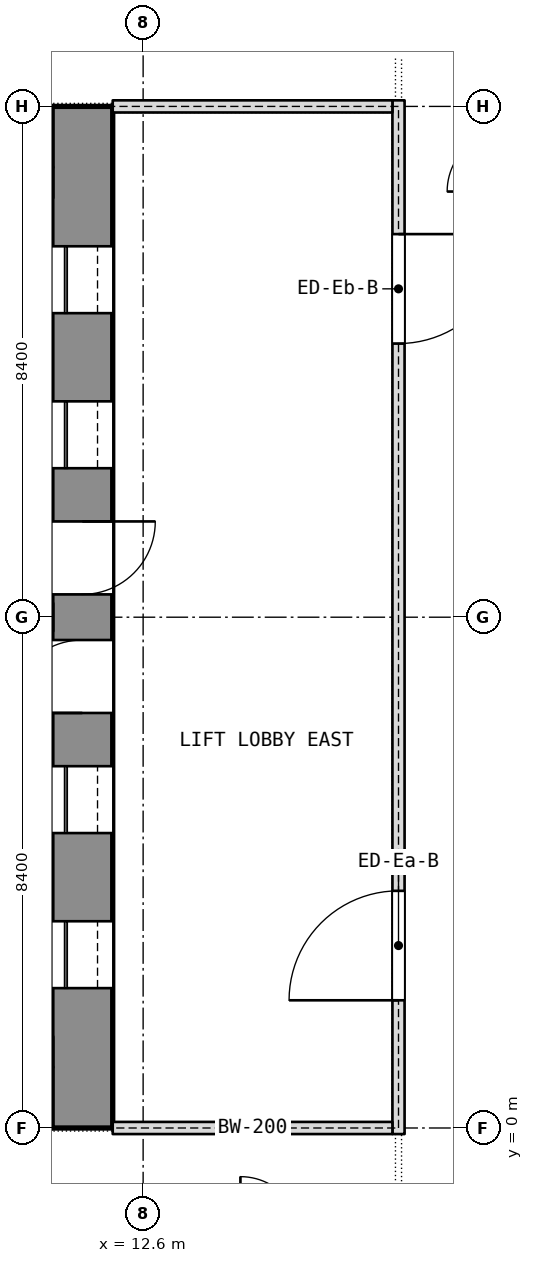
"""IFC4 building model, lengths in metres.
Left out: names, types, materials, properties, quantities, classifications, styles, units other than length and angle.
Written with IfcOpenShell. Run it as: python <this file> out.ifc"""

import sys

from ifc_helpers import new_model, si_unit, direction, frame, frame_2d, origin, place, context, subcontext, project, spatial, rectangle, extrude, element, fill, save


model = new_model("IFC4")
c1 = context("Model", 3, precision=1e-05, world=origin(), true_north=direction((0.0, 1.0)))
c2 = subcontext(c1, "Body", "Model", "MODEL_VIEW")
j1 = project(units=[si_unit("LENGTHUNIT", "METRE"), si_unit("PLANEANGLEUNIT", "RADIAN")], contexts=[c1])
p1 = place(None, origin())
s1 = spatial("IfcSite", under=j1, at=p1, CompositionType="ELEMENT")
p2 = place(p1, origin())
s2 = spatial("IfcBuilding", under=s1, at=p2, CompositionType="ELEMENT")
p3 = place(p2, frame((0.0, 0.0, 162.5)))
s3 = spatial("IfcBuildingStorey", under=s2, at=p3, CompositionType="ELEMENT", Elevation=162.5)
p4 = place(p3, frame((11.6, 0.0, 0.0), z_axis=(0.0, 0.0, 1.0), x_axis=(0.0, 1.0, 0.0)))
e1 = element("IfcWall", 1, at=p4, inside=s3, PredefinedType="SHEAR", context=c2, shape_type="SweptSolid", body=[
    extrude(rectangle(XDim=16.8, YDim=1.0, at=frame_2d((8.4, 0.0))), origin(), (0.0, 0.0, 1.0), 3.6),
])
p5 = place(p4, frame((2.3, 0.0, 0.0)))
e2 = element("IfcOpeningElement", 2, at=p5, cuts=e1, PredefinedType="OPENING", context=c2, shape_type="SweptSolid", body=[
    extrude(rectangle(XDim=1.1, YDim=2.1, at=frame_2d((0.55, 1.05))), frame((0.0, 0.5, 0.0), z_axis=(0.0, -1.0, 0.0), x_axis=(1.0, 0.0, 0.0)), (0.0, 0.0, 1.0), 1.0),
])
p6 = place(p4, frame((4.85, 0.0, 0.0)))
e3 = element("IfcOpeningElement", 3, at=p6, cuts=e1, PredefinedType="OPENING", context=c2, shape_type="SweptSolid", body=[
    extrude(rectangle(XDim=1.1, YDim=2.1, at=frame_2d((0.55, 1.05))), frame((0.0, 0.5, 0.0), z_axis=(0.0, -1.0, 0.0), x_axis=(1.0, 0.0, 0.0)), (0.0, 0.0, 1.0), 1.0),
])
p7 = place(p4, frame((6.825, 0.0, 0.0)))
e4 = element("IfcOpeningElement", 4, at=p7, cuts=e1, PredefinedType="OPENING", context=c2, shape_type="SweptSolid", body=[
    extrude(rectangle(XDim=1.2, YDim=2.1, at=frame_2d((0.6, 1.05))), frame((0.0, 0.5, 0.0), z_axis=(0.0, -1.0, 0.0), x_axis=(1.0, 0.0, 0.0)), (0.0, 0.0, 1.0), 1.0),
])
p8 = place(p4, frame((13.4, 0.0, 0.0)))
e5 = element("IfcOpeningElement", 5, at=p8, cuts=e1, PredefinedType="OPENING", context=c2, shape_type="SweptSolid", body=[
    extrude(rectangle(XDim=1.1, YDim=2.1, at=frame_2d((0.55, 1.05))), frame((0.0, 0.5, 0.0), z_axis=(0.0, -1.0, 0.0), x_axis=(1.0, 0.0, 0.0)), (0.0, 0.0, 1.0), 1.0),
])
p9 = place(p4, frame((10.85, 0.0, 0.0)))
e6 = element("IfcOpeningElement", 6, at=p9, cuts=e1, PredefinedType="OPENING", context=c2, shape_type="SweptSolid", body=[
    extrude(rectangle(XDim=1.1, YDim=2.1, at=frame_2d((0.55, 1.05))), frame((0.0, 0.5, 0.0), z_axis=(0.0, -1.0, 0.0), x_axis=(1.0, 0.0, 0.0)), (0.0, 0.0, 1.0), 1.0),
])
p10 = place(p4, frame((8.775, 0.0, 0.0)))
e7 = element("IfcOpeningElement", 7, at=p10, cuts=e1, PredefinedType="OPENING", context=c2, shape_type="SweptSolid", body=[
    extrude(rectangle(XDim=1.2, YDim=2.1, at=frame_2d((0.6, 1.05))), frame((0.0, 0.5, 0.0), z_axis=(0.0, -1.0, 0.0), x_axis=(1.0, 0.0, 0.0)), (0.0, 0.0, 1.0), 1.0),
])
p11 = place(p3, frame((16.8, -0.1, 0.0), z_axis=(0.0, 0.0, 1.0), x_axis=(0.0, 1.0, 0.0)))
e8 = element("IfcWall", 8, at=p11, inside=s3, PredefinedType="PARTITIONING", context=c2, shape_type="SweptSolid", body=[
    extrude(rectangle(XDim=17.0, YDim=0.2, at=frame_2d((8.5, 0.0))), origin(), (0.0, 0.0, 1.0), 3.34),
])
p12 = place(p11, frame((2.2, 0.0, 0.0)))
e9 = element("IfcOpeningElement", 9, at=p12, cuts=e8, PredefinedType="OPENING", context=c2, shape_type="SweptSolid", body=[
    extrude(rectangle(XDim=1.8, YDim=2.1, at=frame_2d((0.9, 1.05))), frame((0.0, 0.1, 0.0), z_axis=(0.0, -1.0, 0.0), x_axis=(1.0, 0.0, 0.0)), (0.0, 0.0, 1.0), 0.2),
])
p13 = place(p11, frame((13.0, 0.0, 0.0)))
e10 = element("IfcOpeningElement", 10, at=p13, cuts=e8, PredefinedType="OPENING", context=c2, shape_type="SweptSolid", body=[
    extrude(rectangle(XDim=1.8, YDim=2.1, at=frame_2d((0.9, 1.05))), frame((0.0, 0.1, 0.0), z_axis=(0.0, -1.0, 0.0), x_axis=(1.0, 0.0, 0.0)), (0.0, 0.0, 1.0), 0.2),
])
for number, where, z_axis, x_axis in (
    (11, (12.1, 0.0, 0.0), (0.0, 0.0, 1.0), (1.0, 0.0, 0.0)),
    (12, (12.1, 16.8, 0.0), (0.0, 0.0, 1.0), (1.0, 0.0, 0.0)),
):
    element("IfcWall", number, at=place(p3, frame(where, z_axis=z_axis, x_axis=x_axis)), inside=s3, PredefinedType="PARTITIONING", context=c2, shape_type="SweptSolid", body=[
        extrude(rectangle(XDim=4.6, YDim=0.2, at=frame_2d((2.3, 0.0))), origin(), (0.0, 0.0, 1.0), 2.89),
    ])
p14 = place(p5, origin())
e13 = element("IfcDoor", 13, at=p14, inside=s3, OperationType="SLIDING_TO_LEFT", PredefinedType="DOOR", context=c2, shape_type="SweptSolid", body=[
    extrude(rectangle(XDim=1.1, YDim=2.1, at=frame_2d((0.55, 1.05))), frame((0.0, 0.025, 0.0), z_axis=(0.0, -1.0, 0.0), x_axis=(1.0, 0.0, 0.0)), (0.0, 0.0, 1.0), 0.05),
])
fill(e2, e13)
p15 = place(p6, origin())
e14 = element("IfcDoor", 14, at=p15, inside=s3, OperationType="SLIDING_TO_LEFT", PredefinedType="DOOR", context=c2, shape_type="SweptSolid", body=[
    extrude(rectangle(XDim=1.1, YDim=2.1, at=frame_2d((0.55, 1.05))), frame((0.0, 0.025, 0.0), z_axis=(0.0, -1.0, 0.0), x_axis=(1.0, 0.0, 0.0)), (0.0, 0.0, 1.0), 0.05),
])
fill(e3, e14)
p16 = place(p7, origin())
e15 = element("IfcDoor", 15, at=p16, inside=s3, OperationType="SINGLE_SWING_LEFT", PredefinedType="DOOR", context=c2, shape_type="SweptSolid", body=[
    extrude(rectangle(XDim=1.2, YDim=2.1, at=frame_2d((0.6, 1.05))), frame((0.0, 0.025, 0.0), z_axis=(0.0, -1.0, 0.0), x_axis=(1.0, 0.0, 0.0)), (0.0, 0.0, 1.0), 0.05),
])
fill(e4, e15)
p17 = place(p8, origin())
e16 = element("IfcDoor", 16, at=p17, inside=s3, OperationType="SLIDING_TO_LEFT", PredefinedType="DOOR", context=c2, shape_type="SweptSolid", body=[
    extrude(rectangle(XDim=1.1, YDim=2.1, at=frame_2d((0.55, 1.05))), frame((0.0, 0.025, 0.0), z_axis=(0.0, -1.0, 0.0), x_axis=(1.0, 0.0, 0.0)), (0.0, 0.0, 1.0), 0.05),
])
fill(e5, e16)
p18 = place(p9, origin())
e17 = element("IfcDoor", 17, at=p18, inside=s3, OperationType="SLIDING_TO_LEFT", PredefinedType="DOOR", context=c2, shape_type="SweptSolid", body=[
    extrude(rectangle(XDim=1.1, YDim=2.1, at=frame_2d((0.55, 1.05))), frame((0.0, 0.025, 0.0), z_axis=(0.0, -1.0, 0.0), x_axis=(1.0, 0.0, 0.0)), (0.0, 0.0, 1.0), 0.05),
])
fill(e6, e17)
p19 = place(p10, origin())
e18 = element("IfcDoor", 18, at=p19, inside=s3, OperationType="SINGLE_SWING_LEFT", PredefinedType="DOOR", context=c2, shape_type="SweptSolid", body=[
    extrude(rectangle(XDim=1.2, YDim=2.1, at=frame_2d((0.6, 1.05))), frame((0.0, 0.025, 0.0), z_axis=(0.0, -1.0, 0.0), x_axis=(1.0, 0.0, 0.0)), (0.0, 0.0, 1.0), 0.05),
])
fill(e7, e18)
p20 = place(p12, origin())
e19 = element("IfcDoor", 19, at=p20, inside=s3, OperationType="DOUBLE_DOOR_SINGLE_SWING", PredefinedType="DOOR", context=c2, shape_type="SweptSolid", body=[
    extrude(rectangle(XDim=1.8, YDim=2.1, at=frame_2d((0.9, 1.05))), frame((0.0, 0.025, 0.0), z_axis=(0.0, -1.0, 0.0), x_axis=(1.0, 0.0, 0.0)), (0.0, 0.0, 1.0), 0.05),
])
fill(e9, e19)
p21 = place(p13, origin())
e20 = element("IfcDoor", 20, at=p21, inside=s3, OperationType="DOUBLE_DOOR_SINGLE_SWING", PredefinedType="DOOR", context=c2, shape_type="SweptSolid", body=[
    extrude(rectangle(XDim=1.8, YDim=2.1, at=frame_2d((0.9, 1.05))), frame((0.0, 0.025, 0.0), z_axis=(0.0, -1.0, 0.0), x_axis=(1.0, 0.0, 0.0)), (0.0, 0.0, 1.0), 0.05),
])
fill(e10, e20)
save(model, sys.argv[1])
